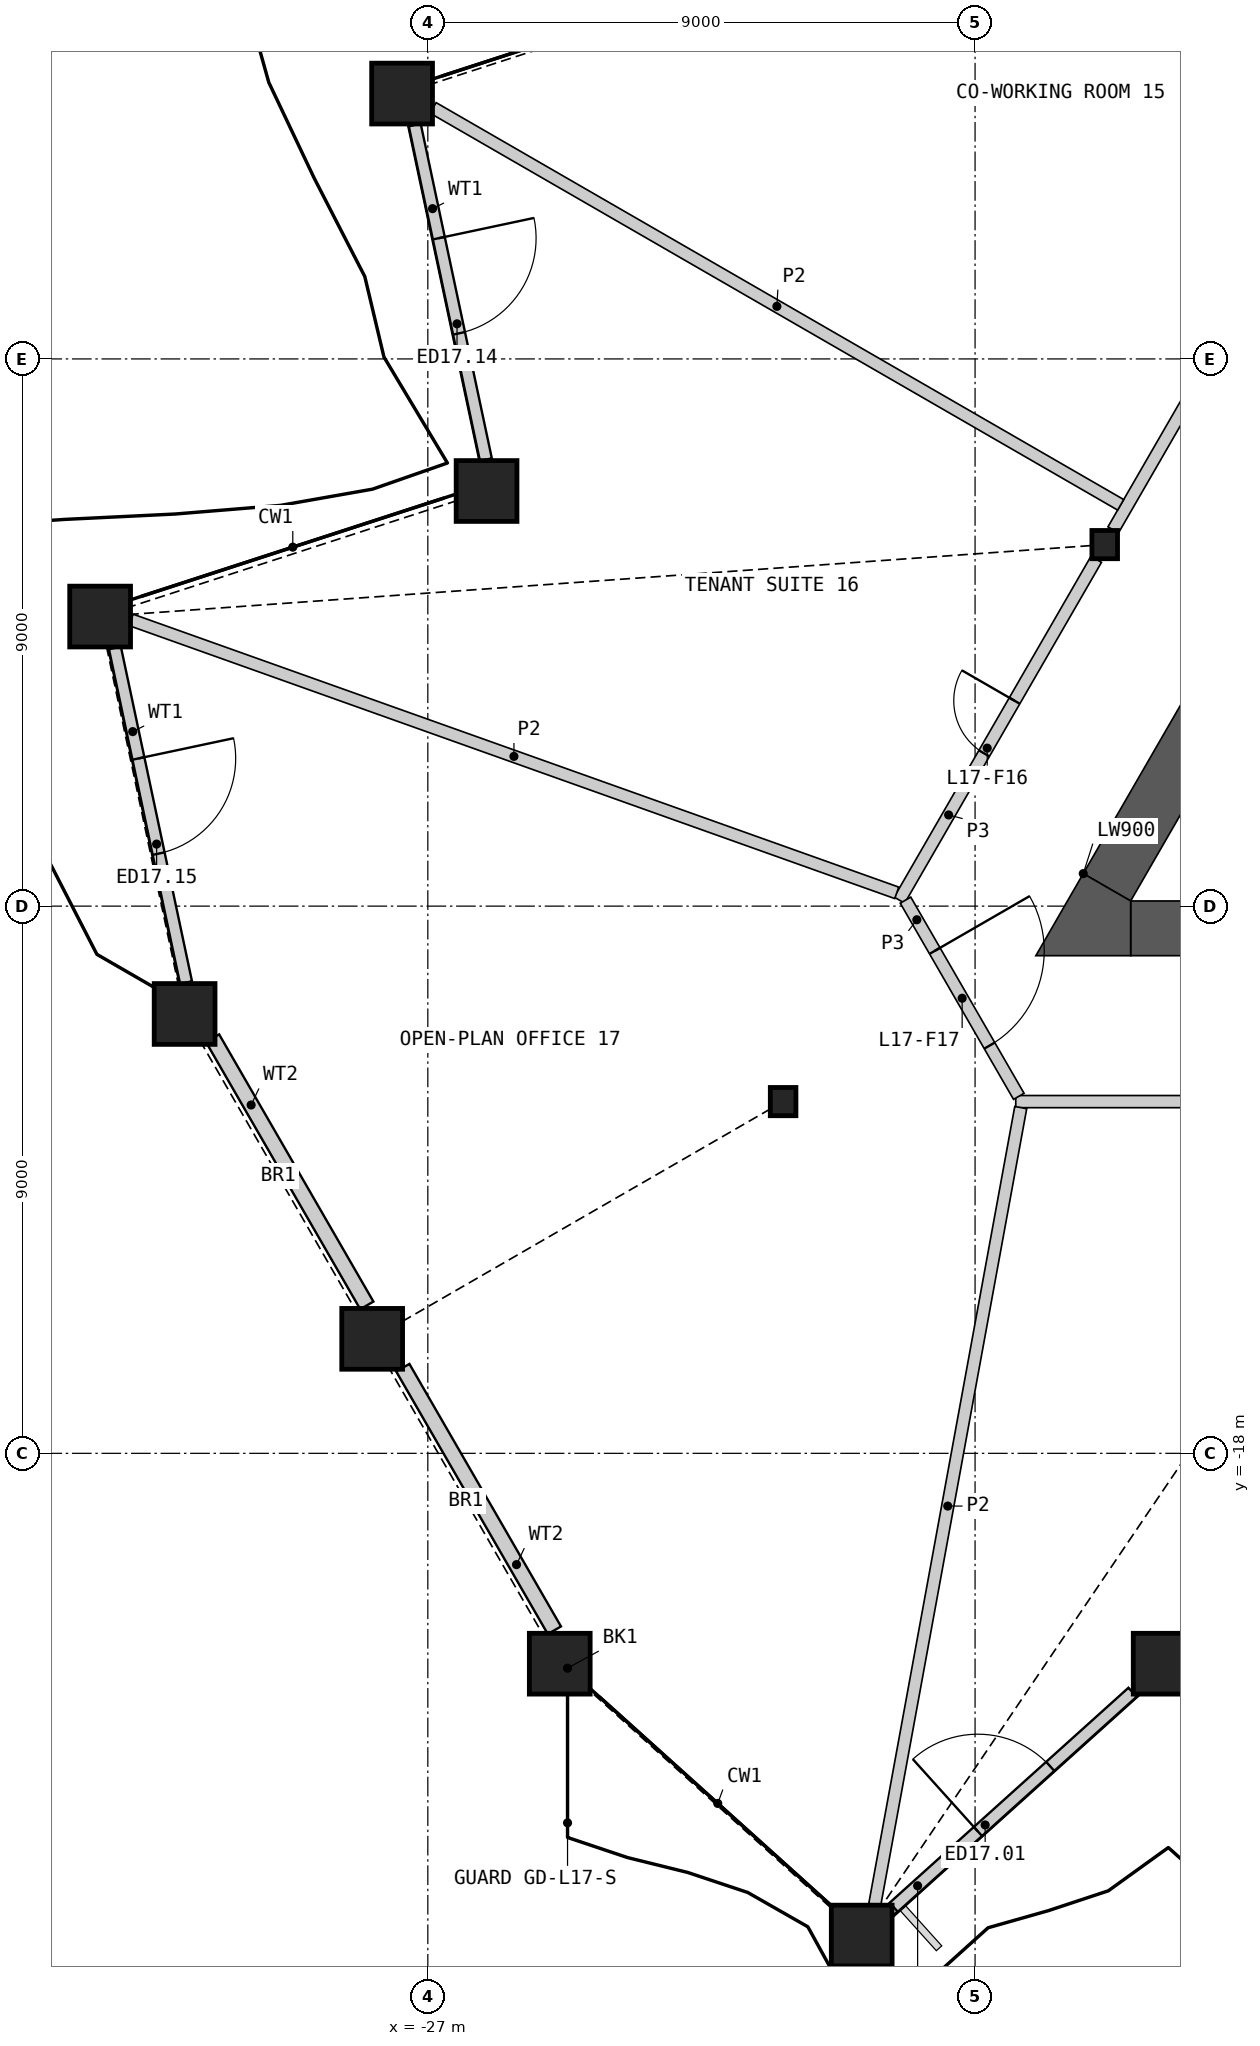
"""IFC4 building model, lengths in metres.
Left out: names, types, materials, properties, quantities, classifications, styles, units other than length and angle.
Written with IfcOpenShell. Run it as: python <this file> out.ifc"""

import sys

from ifc_helpers import new_model, si_unit, direction, frame, frame_2d, origin, origin_2d, place, context, subcontext, project, spatial, polyline, rectangle, hollow_rectangle, i_section, outline, extrude, element, fill, save


model = new_model("IFC4")
c1 = context("Model", 3, precision=1e-05, world=origin(), true_north=direction((0.0, 1.0)))
c2 = subcontext(c1, "Body", "Model", "MODEL_VIEW")
j1 = project(units=[si_unit("LENGTHUNIT", "METRE"), si_unit("PLANEANGLEUNIT", "RADIAN")], contexts=[c1])
p1 = place(None, origin())
s1 = spatial("IfcSite", under=j1, at=p1, CompositionType="ELEMENT")
p2 = place(p1, origin())
s2 = spatial("IfcBuilding", under=s1, at=p2, CompositionType="ELEMENT")
p3 = place(p2, frame((0.0, 0.0, 80.4)))
s3 = spatial("IfcBuildingStorey", under=s2, at=p3, CompositionType="ELEMENT", Elevation=80.4)
for number, where, z_axis, x_axis in (
    (1, (-24.83, -21.46, 0.0), (0.0, 0.0, 1.0), (1.0, 0.0, 0.0)),
    (2, (-19.864, -25.931, 0.0), (0.0, 0.0, 1.0), (1.0, 0.0, 0.0)),
    (3, (-14.898, -21.46, 0.0), (0.0, 0.0, 1.0), (1.0, 0.0, 0.0)),
    (4, (-27.423, 4.364, 0.0), (0.0, 0.0, 1.0), (1.0, 0.0, 0.0)),
    (5, (-26.034, -2.172, 0.0), (0.0, 0.0, 1.0), (1.0, 0.0, 0.0)),
    (6, (-32.389, -4.237, 0.0), (0.0, 0.0, 1.0), (1.0, 0.0, 0.0)),
    (7, (-31.0, -10.774, 0.0), (0.0, 0.0, 1.0), (1.0, 0.0, 0.0)),
    (8, (-27.915, -16.117, 0.0), (0.0, 0.0, 1.0), (1.0, 0.0, 0.0)),
):
    element("IfcColumn", number, at=place(p3, frame(where, z_axis=z_axis, x_axis=x_axis)), inside=s3, PredefinedType="COLUMN", context=c2, shape_type="SweptSolid", body=[
        extrude(hollow_rectangle(XDim=1.0, YDim=1.0, WallThickness=0.07, at=origin_2d()), origin(), (0.0, 0.0, 1.0), 4.2),
    ])
for number, where, z_axis, x_axis in (
    (9, (-15.868, -3.054, 0.0), (0.0, 0.0, 1.0), (1.0, 0.0, 0.0)),
    (10, (-21.157, -12.215, 0.0), (0.0, 0.0, 1.0), (1.0, 0.0, 0.0)),
):
    element("IfcColumn", number, at=place(p3, frame(where, z_axis=z_axis, x_axis=x_axis)), inside=s3, PredefinedType="COLUMN", context=c2, shape_type="SweptSolid", body=[
        extrude(i_section(OverallWidth=0.421, OverallDepth=0.465, WebThickness=0.045, FlangeThickness=0.072, at=origin_2d()), origin(), (0.0, 0.0, 1.0), 4.2),
    ])
p4 = place(p3, frame((-19.337, -25.466, 0.0), z_axis=(0.0, 0.0, 1.0), x_axis=(0.743124116755, 0.669153605009, 0.0)))
e11 = element("IfcWall", 11, at=p4, inside=s3, PredefinedType="SOLIDWALL", context=c2, shape_type="SweptSolid", body=[
    extrude(rectangle(XDim=5.284, YDim=0.2, at=frame_2d((2.642, 0.0))), origin(), (0.0, 0.0, 1.0), 3.189),
])
p5 = place(p4, frame((1.863, 0.0, 0.0)))
e12 = element("IfcOpeningElement", 12, at=p5, cuts=e11, PredefinedType="OPENING", context=c2, shape_type="SweptSolid", body=[
    extrude(rectangle(XDim=1.6, YDim=2.4, at=frame_2d((0.8, 1.2))), frame((0.0, 0.11, 0.0), z_axis=(0.0, -1.0, 0.0), x_axis=(1.0, 0.0, 0.0)), (0.0, 0.0, 1.0), 0.22),
])
p6 = place(p3, frame((-27.215, 3.848, 0.0), z_axis=(0.0, 0.0, 1.0), x_axis=(0.207901831982, -0.978149696242, 0.0)))
e13 = element("IfcWall", 13, at=p6, inside=s3, PredefinedType="SOLIDWALL", context=c2, shape_type="SweptSolid", body=[
    extrude(rectangle(XDim=5.626, YDim=0.2, at=frame_2d((2.813, 0.0))), origin(), (0.0, 0.0, 1.0), 3.189),
])
p7 = place(p6, frame((1.903, 0.0, 0.0)))
e14 = element("IfcOpeningElement", 14, at=p7, cuts=e13, PredefinedType="OPENING", context=c2, shape_type="SweptSolid", body=[
    extrude(rectangle(XDim=1.6, YDim=2.4, at=frame_2d((0.8, 1.2))), frame((0.0, 0.11, 0.0), z_axis=(0.0, -1.0, 0.0), x_axis=(1.0, 0.0, 0.0)), (0.0, 0.0, 1.0), 0.22),
])
p8 = place(p3, frame((-32.146, -4.754, 0.0), z_axis=(0.0, 0.0, 1.0), x_axis=(0.207901831982, -0.978149696242, 0.0)))
e15 = element("IfcWall", 15, at=p8, inside=s3, PredefinedType="SOLIDWALL", context=c2, shape_type="SweptSolid", body=[
    extrude(rectangle(XDim=5.626, YDim=0.2, at=frame_2d((2.813, 0.0))), origin(), (0.0, 0.0, 1.0), 3.189),
])
p9 = place(p8, frame((1.858, 0.0, 0.0)))
e16 = element("IfcOpeningElement", 16, at=p9, cuts=e15, PredefinedType="OPENING", context=c2, shape_type="SweptSolid", body=[
    extrude(rectangle(XDim=1.6, YDim=2.4, at=frame_2d((0.8, 1.2))), frame((0.0, 0.11, 0.0), z_axis=(0.0, -1.0, 0.0), x_axis=(1.0, 0.0, 0.0)), (0.0, 0.0, 1.0), 0.22),
])
p10 = place(p3, frame((-30.54, -11.172, 0.0), z_axis=(0.0, 0.0, 1.0), x_axis=(0.500004250643, -0.866022949661, 0.0)))
e17 = element("IfcWall", 17, at=p10, inside=s3, PredefinedType="SOLIDWALL", context=c2, shape_type="SweptSolid", body=[
    extrude(rectangle(XDim=5.075, YDim=0.25, at=frame_2d((2.537, 0.0))), origin(), (0.0, 0.0, 1.0), 3.189),
])
p11 = place(p3, frame((-27.411, -16.592, 0.0), z_axis=(0.0, 0.0, 1.0), x_axis=(0.499978178329, -0.866038002165, 0.0)))
e18 = element("IfcWall", 18, at=p11, inside=s3, PredefinedType="SOLIDWALL", context=c2, shape_type="SweptSolid", body=[
    extrude(rectangle(XDim=4.986, YDim=0.25, at=frame_2d((2.493, 0.0))), origin(), (0.0, 0.0, 1.0), 3.189),
])
p12 = place(p3, frame((-15.441, -9.365, 0.0), z_axis=(0.0, 0.0, 1.0), x_axis=(1.0, 0.0, 0.0)))
e19 = element("IfcWall", 19, at=p12, inside=s3, PredefinedType="SHEAR", context=c2, shape_type="SweptSolid", body=[
    extrude(rectangle(XDim=8.871, YDim=0.9, at=frame_2d((4.435, 0.0))), origin(), (0.0, 0.0, 1.0), 3.8),
])
p13 = place(p3, frame((-10.31, 0.872, 0.0), z_axis=(0.0, 0.0, 1.0), x_axis=(-0.499991697393, -0.866030197244, 0.0)))
e20 = element("IfcWall", 20, at=p13, inside=s3, PredefinedType="SHEAR", context=c2, shape_type="SweptSolid", body=[
    extrude(rectangle(XDim=11.041, YDim=0.9, at=frame_2d((5.521, 0.0))), origin(), (0.0, 0.0, 1.0), 3.8),
])
p14 = place(p3, origin())
e21 = element("IfcWall", 21, at=p14, inside=s3, PredefinedType="SHEAR", context=c2, shape_type="SweptSolid", body=[
    extrude(outline(polyline([(-16.221, -8.465), (-15.441, -8.915), (-15.441, -9.815), (-17.0, -9.815), (-16.221, -8.465)])), origin(), (0.0, 0.0, 1.0), 3.8),
])
p15 = place(p3, frame((-15.728, -2.811, 0.0), z_axis=(0.0, 0.0, 1.0), x_axis=(0.49999175339, 0.866030164915, 0.0)))
e22 = element("IfcWall", 22, at=p15, inside=s3, PredefinedType="PARTITIONING", context=c2, shape_type="SweptSolid", body=[
    extrude(rectangle(XDim=10.019, YDim=0.2, at=frame_2d((5.009, 0.0))), origin(), (0.0, 0.0, 1.0), 3.8),
])
p16 = place(p15, frame((4.76, 0.0, 0.0)))
e23 = element("IfcOpeningElement", 23, at=p16, cuts=e22, PredefinedType="OPENING", context=c2, shape_type="SweptSolid", body=[
    extrude(rectangle(XDim=1.0, YDim=2.1, at=frame_2d((0.5, 1.05))), frame((0.0, 0.11, 0.0), z_axis=(0.0, -1.0, 0.0), x_axis=(1.0, 0.0, 0.0)), (0.0, 0.0, 1.0), 0.22),
])
p17 = place(p3, frame((-17.331, -12.215, 0.0), z_axis=(0.0, 0.0, 1.0), x_axis=(1.0, 0.0, 0.0)))
e24 = element("IfcWall", 24, at=p17, inside=s3, PredefinedType="PARTITIONING", context=c2, shape_type="SweptSolid", body=[
    extrude(rectangle(XDim=6.51, YDim=0.2, at=frame_2d((3.255, 0.0))), origin(), (0.0, 0.0, 1.0), 3.8),
])
p18 = place(p3, frame((-19.244, -8.902, 0.0), z_axis=(0.0, 0.0, 1.0), x_axis=(0.499984737558, 0.86603421538, 0.0)))
e25 = element("IfcWall", 25, at=p18, inside=s3, PredefinedType="PARTITIONING", context=c2, shape_type="SweptSolid", body=[
    extrude(rectangle(XDim=6.473, YDim=0.2, at=frame_2d((3.236, 0.0))), origin(), (0.0, 0.0, 1.0), 3.8),
])
p19 = place(p18, frame((2.787, 0.0, 0.0)))
e26 = element("IfcOpeningElement", 26, at=p19, cuts=e25, PredefinedType="OPENING", context=c2, shape_type="SweptSolid", body=[
    extrude(rectangle(XDim=1.0, YDim=2.1, at=frame_2d((0.5, 1.05))), frame((0.0, 0.11, 0.0), z_axis=(0.0, -1.0, 0.0), x_axis=(1.0, 0.0, 0.0)), (0.0, 0.0, 1.0), 0.22),
])
p20 = place(p3, frame((-19.144, -8.902, 0.0), z_axis=(0.0, 0.0, 1.0), x_axis=(0.499958791762, -0.866049194065, 0.0)))
e27 = element("IfcWall", 27, at=p20, inside=s3, PredefinedType="PARTITIONING", context=c2, shape_type="SweptSolid", body=[
    extrude(rectangle(XDim=3.726, YDim=0.2, at=frame_2d((1.863, 0.0))), origin(), (0.0, 0.0, 1.0), 3.8),
])
p21 = place(p20, frame((0.963, 0.0, 0.0)))
e28 = element("IfcOpeningElement", 28, at=p21, cuts=e27, PredefinedType="OPENING", context=c2, shape_type="SweptSolid", body=[
    extrude(rectangle(XDim=1.8, YDim=2.1, at=frame_2d((0.9, 1.05))), frame((0.0, 0.11, 0.0), z_axis=(0.0, -1.0, 0.0), x_axis=(1.0, 0.0, 0.0)), (0.0, 0.0, 1.0), 0.22),
])
p22 = place(p3, frame((-31.879, -4.293, 0.0), z_axis=(0.0, 0.0, 1.0), x_axis=(0.94194008836, -0.33578098508, 0.0)))
e29 = element("IfcWall", 29, at=p22, inside=s3, PredefinedType="PARTITIONING", context=c2, shape_type="SweptSolid", body=[
    extrude(rectangle(XDim=13.367, YDim=0.2, at=frame_2d((6.684, 0.0))), origin(), (0.0, 0.0, 1.0), 2.885),
])
p23 = place(p3, frame((-19.65, -25.421, 0.0), z_axis=(0.0, 0.0, 1.0), x_axis=(0.180179866985, 0.983633679544, 0.0)))
e30 = element("IfcWall", 30, at=p23, inside=s3, PredefinedType="PARTITIONING", context=c2, shape_type="SweptSolid", body=[
    extrude(rectangle(XDim=13.326, YDim=0.2, at=frame_2d((6.663, 0.0))), origin(), (0.0, 0.0, 1.0), 2.885),
])
p24 = place(p3, frame((-26.913, 4.129, 0.0), z_axis=(0.0, 0.0, 1.0), x_axis=(0.866026475891, -0.499998143053, 0.0)))
e31 = element("IfcWall", 31, at=p24, inside=s3, PredefinedType="PARTITIONING", context=c2, shape_type="SweptSolid", body=[
    extrude(rectangle(XDim=13.057, YDim=0.2, at=frame_2d((6.529, 0.0))), origin(), (0.0, 0.0, 1.0), 2.885),
])
p25 = place(p5, origin())
e32 = element("IfcDoor", 32, at=p25, inside=s3, OperationType="DOUBLE_DOOR_SINGLE_SWING", PredefinedType="DOOR", context=c2, shape_type="SweptSolid", body=[
    extrude(rectangle(XDim=1.6, YDim=2.4, at=frame_2d((0.8, 1.2))), frame((0.0, 0.025, 0.0), z_axis=(0.0, -1.0, 0.0), x_axis=(1.0, 0.0, 0.0)), (0.0, 0.0, 1.0), 0.05),
])
fill(e12, e32)
p26 = place(p7, origin())
e33 = element("IfcDoor", 33, at=p26, inside=s3, OperationType="DOUBLE_DOOR_SINGLE_SWING", PredefinedType="DOOR", context=c2, shape_type="SweptSolid", body=[
    extrude(rectangle(XDim=1.6, YDim=2.4, at=frame_2d((0.8, 1.2))), frame((0.0, 0.025, 0.0), z_axis=(0.0, -1.0, 0.0), x_axis=(1.0, 0.0, 0.0)), (0.0, 0.0, 1.0), 0.05),
])
fill(e14, e33)
p27 = place(p9, origin())
e34 = element("IfcDoor", 34, at=p27, inside=s3, OperationType="DOUBLE_DOOR_SINGLE_SWING", PredefinedType="DOOR", context=c2, shape_type="SweptSolid", body=[
    extrude(rectangle(XDim=1.6, YDim=2.4, at=frame_2d((0.8, 1.2))), frame((0.0, 0.025, 0.0), z_axis=(0.0, -1.0, 0.0), x_axis=(1.0, 0.0, 0.0)), (0.0, 0.0, 1.0), 0.05),
])
fill(e16, e34)
p28 = place(p19, origin())
e35 = element("IfcDoor", 35, at=p28, inside=s3, OperationType="SINGLE_SWING_RIGHT", PredefinedType="DOOR", context=c2, shape_type="SweptSolid", body=[
    extrude(rectangle(XDim=1.0, YDim=2.1, at=frame_2d((0.5, 1.05))), frame((0.0, 0.025, 0.0), z_axis=(0.0, -1.0, 0.0), x_axis=(1.0, 0.0, 0.0)), (0.0, 0.0, 1.0), 0.05),
])
fill(e26, e35)
p29 = place(p21, origin())
e36 = element("IfcDoor", 36, at=p29, inside=s3, OperationType="DOUBLE_DOOR_SINGLE_SWING", PredefinedType="DOOR", context=c2, shape_type="SweptSolid", body=[
    extrude(rectangle(XDim=1.8, YDim=2.1, at=frame_2d((0.9, 1.05))), frame((0.0, 0.025, 0.0), z_axis=(0.0, -1.0, 0.0), x_axis=(1.0, 0.0, 0.0)), (0.0, 0.0, 1.0), 0.05),
])
fill(e28, e36)
save(model, sys.argv[1])
